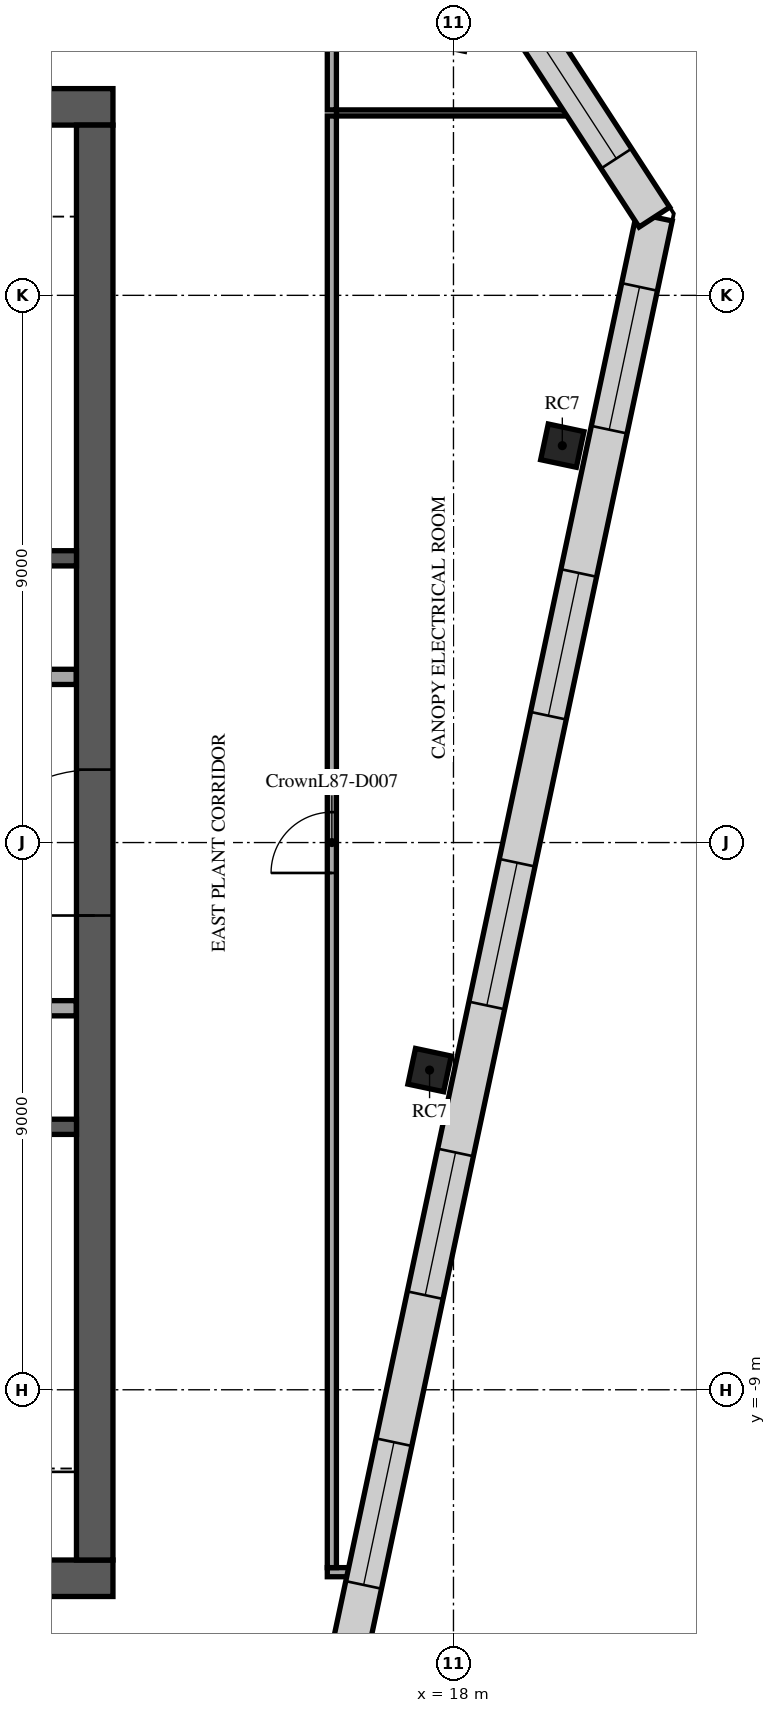
"""IFC4 building model, lengths in metres.
Left out: names, types, materials, properties, quantities, classifications, styles, units other than length and angle.
Written with IfcOpenShell. Run it as: python <this file> out.ifc"""

import sys

from ifc_helpers import new_model, si_unit, direction, frame, frame_2d, origin, origin_2d, place, context, subcontext, project, spatial, rectangle, extrude, element, fill, save


model = new_model("IFC4")
c1 = context("Model", 3, precision=1e-05, world=origin(), true_north=direction((0.0, 1.0)))
c2 = subcontext(c1, "Body", "Model", "MODEL_VIEW")
j1 = project(units=[si_unit("LENGTHUNIT", "METRE"), si_unit("PLANEANGLEUNIT", "RADIAN")], contexts=[c1])
p1 = place(None, origin())
s1 = spatial("IfcSite", under=j1, at=p1, CompositionType="ELEMENT")
p2 = place(p1, origin())
s2 = spatial("IfcBuilding", under=s1, at=p2, CompositionType="ELEMENT")
p3 = place(p2, frame((0.0, 0.0, 373.1)))
s3 = spatial("IfcBuildingStorey", under=s2, at=p3, CompositionType="ELEMENT", Elevation=373.1)
for number, where, z_axis, x_axis in (
    (1, (17.607, -3.742, 0.0), (0.0, 0.0, 1.0), (0.208, 0.978, 0.0)),
    (2, (19.79, 6.528, 0.0), (0.0, 0.0, 1.0), (0.208, 0.978, 0.0)),
):
    element("IfcColumn", number, at=place(p3, frame(where, z_axis=z_axis, x_axis=x_axis)), inside=s3, PredefinedType="COLUMN", context=c2, shape_type="SweptSolid", body=[
        extrude(rectangle(XDim=0.6, YDim=0.6, at=origin_2d()), origin(), (0.0, 0.0, 1.0), 3.5),
    ])
p4 = place(p3, frame((-12.4, 12.1, 0.0), z_axis=(0.0, 0.0, 1.0), x_axis=(1.0, 0.0, 0.0)))
e3 = element("IfcWall", 3, at=p4, inside=s3, PredefinedType="SHEAR", context=c2, shape_type="SweptSolid", body=[
    extrude(rectangle(XDim=24.8, YDim=0.6, at=frame_2d((12.4, 0.0))), origin(), (0.0, 0.0, 1.0), 3.2),
])
p5 = place(p4, frame((11.2, 0.0, 0.0)))
e4 = element("IfcOpeningElement", 4, at=p5, cuts=e3, PredefinedType="OPENING", context=c2, shape_type="SweptSolid", body=[
    extrude(rectangle(XDim=2.4, YDim=2.4, at=frame_2d((1.2, 1.2))), frame((0.0, 0.31, 0.0), z_axis=(0.0, -1.0, 0.0), x_axis=(1.0, 0.0, 0.0)), (0.0, 0.0, 1.0), 0.62),
])
p6 = place(p4, frame((22.025, 0.0, 0.0)))
e5 = element("IfcOpeningElement", 5, at=p6, cuts=e3, PredefinedType="OPENING", context=c2, shape_type="SweptSolid", body=[
    extrude(rectangle(XDim=1.2, YDim=2.1, at=frame_2d((0.6, 1.05))), frame((0.0, 0.31, 0.0), z_axis=(0.0, -1.0, 0.0), x_axis=(1.0, 0.0, 0.0)), (0.0, 0.0, 1.0), 0.62),
])
p7 = place(p4, frame((1.0, 0.0, 0.0)))
e6 = element("IfcOpeningElement", 6, at=p7, cuts=e3, PredefinedType="OPENING", context=c2, shape_type="SweptSolid", body=[
    extrude(rectangle(XDim=1.0, YDim=2.1, at=frame_2d((0.5, 1.05))), frame((0.0, 0.31, 0.0), z_axis=(0.0, -1.0, 0.0), x_axis=(1.0, 0.0, 0.0)), (0.0, 0.0, 1.0), 0.62),
])
p8 = place(p3, frame((-12.4, -12.1, 0.0), z_axis=(0.0, 0.0, 1.0), x_axis=(1.0, 0.0, 0.0)))
e7 = element("IfcWall", 7, at=p8, inside=s3, PredefinedType="SHEAR", context=c2, shape_type="SweptSolid", body=[
    extrude(rectangle(XDim=24.8, YDim=0.6, at=frame_2d((12.4, 0.0))), origin(), (0.0, 0.0, 1.0), 3.2),
])
p9 = place(p8, frame((7.3, 0.0, 0.0)))
e8 = element("IfcOpeningElement", 8, at=p9, cuts=e7, PredefinedType="OPENING", context=c2, shape_type="SweptSolid", body=[
    extrude(rectangle(XDim=2.0, YDim=2.1, at=frame_2d((1.0, 1.05))), frame((0.0, 0.31, 0.0), z_axis=(0.0, -1.0, 0.0), x_axis=(1.0, 0.0, 0.0)), (0.0, 0.0, 1.0), 0.62),
])
p10 = place(p8, frame((17.425, 0.0, 0.0)))
e9 = element("IfcOpeningElement", 9, at=p10, cuts=e7, PredefinedType="OPENING", context=c2, shape_type="SweptSolid", body=[
    extrude(rectangle(XDim=1.2, YDim=2.1, at=frame_2d((0.6, 1.05))), frame((0.0, 0.31, 0.0), z_axis=(0.0, -1.0, 0.0), x_axis=(1.0, 0.0, 0.0)), (0.0, 0.0, 1.0), 0.62),
])
p11 = place(p8, frame((1.575, 0.0, 0.0)))
e10 = element("IfcOpeningElement", 10, at=p11, cuts=e7, PredefinedType="OPENING", context=c2, shape_type="SweptSolid", body=[
    extrude(rectangle(XDim=1.2, YDim=2.1, at=frame_2d((0.6, 1.05))), frame((0.0, 0.31, 0.0), z_axis=(0.0, -1.0, 0.0), x_axis=(1.0, 0.0, 0.0)), (0.0, 0.0, 1.0), 0.62),
])
p12 = place(p8, frame((22.025, 0.0, 0.0)))
e11 = element("IfcOpeningElement", 11, at=p12, cuts=e7, PredefinedType="OPENING", context=c2, shape_type="SweptSolid", body=[
    extrude(rectangle(XDim=1.2, YDim=2.1, at=frame_2d((0.6, 1.05))), frame((0.0, 0.31, 0.0), z_axis=(0.0, -1.0, 0.0), x_axis=(1.0, 0.0, 0.0)), (0.0, 0.0, 1.0), 0.62),
])
p13 = place(p3, frame((12.1, -11.8, 0.0), z_axis=(0.0, 0.0, 1.0), x_axis=(0.0, 1.0, 0.0)))
e12 = element("IfcWall", 12, at=p13, inside=s3, PredefinedType="SHEAR", context=c2, shape_type="SweptSolid", body=[
    extrude(rectangle(XDim=23.6, YDim=0.6, at=frame_2d((11.8, 0.0))), origin(), (0.0, 0.0, 1.0), 3.2),
])
p14 = place(p13, frame((10.6, 0.0, 0.0)))
e13 = element("IfcOpeningElement", 13, at=p14, cuts=e12, PredefinedType="OPENING", context=c2, shape_type="SweptSolid", body=[
    extrude(rectangle(XDim=2.4, YDim=2.4, at=frame_2d((1.2, 1.2))), frame((0.0, 0.31, 0.0), z_axis=(0.0, -1.0, 0.0), x_axis=(1.0, 0.0, 0.0)), (0.0, 0.0, 1.0), 0.62),
])
for number, where, z_axis, x_axis in (
    (14, (8.65, 4.675, 0.0), (0.0, 0.0, 1.0), (1.0, 0.0, 0.0)),
    (15, (8.65, -4.675, 0.0), (0.0, 0.0, 1.0), (1.0, 0.0, 0.0)),
):
    element("IfcWall", number, at=place(p3, frame(where, z_axis=z_axis, x_axis=x_axis)), inside=s3, PredefinedType="SOLIDWALL", context=c2, shape_type="SweptSolid", body=[
        extrude(rectangle(XDim=3.15, YDim=0.25, at=frame_2d((1.575, 0.0))), origin(), (0.0, 0.0, 1.0), 3.2),
    ])
p15 = place(p3, frame((5.63, -2.725, 0.0), z_axis=(0.0, 0.0, 1.0), x_axis=(1.0, 0.0, 0.0)))
e16 = element("IfcWall", 16, at=p15, inside=s3, PredefinedType="PARTITIONING", context=c2, shape_type="SweptSolid", body=[
    extrude(rectangle(XDim=6.165, YDim=0.25, at=frame_2d((3.083, 0.0))), origin(), (0.0, 0.0, 1.0), 3.2),
])
p16 = place(p15, frame((0.745, 0.0, 0.0)))
e17 = element("IfcOpeningElement", 17, at=p16, cuts=e16, PredefinedType="OPENING", context=c2, shape_type="SweptSolid", body=[
    extrude(rectangle(XDim=1.0, YDim=2.1, at=frame_2d((0.5, 1.05))), frame((0.0, 0.135, 0.0), z_axis=(0.0, -1.0, 0.0), x_axis=(1.0, 0.0, 0.0)), (0.0, 0.0, 1.0), 0.27),
])
p17 = place(p15, frame((3.92, 0.0, 0.0)))
e18 = element("IfcOpeningElement", 18, at=p17, cuts=e16, PredefinedType="OPENING", context=c2, shape_type="SweptSolid", body=[
    extrude(rectangle(XDim=0.9, YDim=2.1, at=frame_2d((0.45, 1.05))), frame((0.0, 0.135, 0.0), z_axis=(0.0, -1.0, 0.0), x_axis=(1.0, 0.0, 0.0)), (0.0, 0.0, 1.0), 0.27),
])
p18 = place(p3, frame((-11.795, 2.725, 0.0), z_axis=(0.0, 0.0, 1.0), x_axis=(1.0, 0.0, 0.0)))
e19 = element("IfcWall", 19, at=p18, inside=s3, PredefinedType="PARTITIONING", context=c2, shape_type="SweptSolid", body=[
    extrude(rectangle(XDim=23.59, YDim=0.25, at=frame_2d((11.795, 0.0))), origin(), (0.0, 0.0, 1.0), 3.2),
])
p19 = place(p18, frame((21.345, 0.0, 0.0)))
e20 = element("IfcOpeningElement", 20, at=p19, cuts=e19, PredefinedType="OPENING", context=c2, shape_type="SweptSolid", body=[
    extrude(rectangle(XDim=0.9, YDim=2.1, at=frame_2d((0.45, 1.05))), frame((0.0, 0.135, 0.0), z_axis=(0.0, -1.0, 0.0), x_axis=(1.0, 0.0, 0.0)), (0.0, 0.0, 1.0), 0.27),
])
p20 = place(p18, frame((1.345, 0.0, 0.0)))
e21 = element("IfcOpeningElement", 21, at=p20, cuts=e19, PredefinedType="OPENING", context=c2, shape_type="SweptSolid", body=[
    extrude(rectangle(XDim=0.9, YDim=2.1, at=frame_2d((0.45, 1.05))), frame((0.0, 0.135, 0.0), z_axis=(0.0, -1.0, 0.0), x_axis=(1.0, 0.0, 0.0)), (0.0, 0.0, 1.0), 0.27),
])
p21 = place(p18, frame((4.42, 0.0, 0.0)))
e22 = element("IfcOpeningElement", 22, at=p21, cuts=e19, PredefinedType="OPENING", context=c2, shape_type="SweptSolid", body=[
    extrude(rectangle(XDim=1.0, YDim=2.1, at=frame_2d((0.5, 1.05))), frame((0.0, 0.135, 0.0), z_axis=(0.0, -1.0, 0.0), x_axis=(1.0, 0.0, 0.0)), (0.0, 0.0, 1.0), 0.27),
])
p22 = place(p18, frame((7.17, 0.0, 0.0)))
e23 = element("IfcOpeningElement", 23, at=p22, cuts=e19, PredefinedType="OPENING", context=c2, shape_type="SweptSolid", body=[
    extrude(rectangle(XDim=1.0, YDim=2.1, at=frame_2d((0.5, 1.05))), frame((0.0, 0.135, 0.0), z_axis=(0.0, -1.0, 0.0), x_axis=(1.0, 0.0, 0.0)), (0.0, 0.0, 1.0), 0.27),
])
p23 = place(p18, frame((12.57, 0.0, 0.0)))
e24 = element("IfcOpeningElement", 24, at=p23, cuts=e19, PredefinedType="OPENING", context=c2, shape_type="SweptSolid", body=[
    extrude(rectangle(XDim=1.2, YDim=2.1, at=frame_2d((0.6, 1.05))), frame((0.0, 0.135, 0.0), z_axis=(0.0, -1.0, 0.0), x_axis=(1.0, 0.0, 0.0)), (0.0, 0.0, 1.0), 0.27),
])
p24 = place(p3, frame((15.925, -12.0, 0.0), z_axis=(0.0, 0.0, 1.0), x_axis=(1.0, 0.0, 0.0)))
e25 = element("IfcWall", 25, at=p24, inside=s3, PredefinedType="PARTITIONING", context=c2, shape_type="SweptSolid", body=[
    extrude(rectangle(XDim=0.54, YDim=0.15, at=frame_2d((0.27, 0.0))), origin(), (0.0, 0.0, 1.0), 3.2),
])
p25 = place(p3, frame((16.075, 12.0, 0.0), z_axis=(0.0, 0.0, 1.0), x_axis=(1.0, 0.0, 0.0)))
e26 = element("IfcWall", 26, at=p25, inside=s3, PredefinedType="PARTITIONING", context=c2, shape_type="SweptSolid", body=[
    extrude(rectangle(XDim=3.997, YDim=0.1, at=frame_2d((1.999, 0.0))), origin(), (0.0, 0.0, 1.0), 3.2),
])
p26 = place(p3, frame((16.0, -11.925, 0.0), z_axis=(0.0, 0.0, 1.0), x_axis=(0.0, 1.0, 0.0)))
e27 = element("IfcWall", 27, at=p26, inside=s3, PredefinedType="PARTITIONING", context=c2, shape_type="SweptSolid", body=[
    extrude(rectangle(XDim=23.875, YDim=0.15, at=frame_2d((11.938, 0.0))), origin(), (0.0, 0.0, 1.0), 2.63),
])
p27 = place(p26, frame((11.425, 0.0, 0.0)))
e28 = element("IfcOpeningElement", 28, at=p27, cuts=e27, PredefinedType="OPENING", context=c2, shape_type="SweptSolid", body=[
    extrude(rectangle(XDim=1.0, YDim=2.1, at=frame_2d((0.5, 1.05))), frame((0.0, 0.085, 0.0), z_axis=(0.0, -1.0, 0.0), x_axis=(1.0, 0.0, 0.0)), (0.0, 0.0, 1.0), 0.17),
])
p28 = place(p3, frame((16.0, 12.05, 0.0), z_axis=(0.0, 0.0, 1.0), x_axis=(0.0, 1.0, 0.0)))
e29 = element("IfcWall", 29, at=p28, inside=s3, PredefinedType="PARTITIONING", context=c2, shape_type="SweptSolid", body=[
    extrude(rectangle(XDim=3.875, YDim=0.15, at=frame_2d((1.938, 0.0))), origin(), (0.0, 0.0, 1.0), 2.63),
])
p29 = place(p3, frame((15.279, -18.062, 0.0), z_axis=(0.0, 0.0, 1.0), x_axis=(0.207909936091, 0.978147973711, 0.0)))
e30 = element("IfcWall", 30, at=p29, inside=s3, PredefinedType="STANDARD", context=c2, shape_type="SweptSolid", body=[
    extrude(rectangle(XDim=28.982, YDim=0.6, at=frame_2d((14.491, 0.0))), origin(), (0.0, 0.0, 1.0), 3.2),
])
p30 = place(p29, frame((1.174, 0.0, 0.6)))
e31 = element("IfcOpeningElement", 31, at=p30, cuts=e30, PredefinedType="OPENING", context=c2, shape_type="SweptSolid", body=[
    extrude(rectangle(XDim=2.4, YDim=1.85, at=frame_2d((1.2, 0.925))), frame((0.0, 0.31, 0.0), z_axis=(0.0, -1.0, 0.0), x_axis=(1.0, 0.0, 0.0)), (0.0, 0.0, 1.0), 0.62),
])
p31 = place(p29, frame((5.983, 0.0, 0.6)))
e32 = element("IfcOpeningElement", 32, at=p31, cuts=e30, PredefinedType="OPENING", context=c2, shape_type="SweptSolid", body=[
    extrude(rectangle(XDim=2.4, YDim=1.85, at=frame_2d((1.2, 0.925))), frame((0.0, 0.31, 0.0), z_axis=(0.0, -1.0, 0.0), x_axis=(1.0, 0.0, 0.0)), (0.0, 0.0, 1.0), 0.62),
])
p32 = place(p29, frame((10.855, 0.0, 0.6)))
e33 = element("IfcOpeningElement", 33, at=p32, cuts=e30, PredefinedType="OPENING", context=c2, shape_type="SweptSolid", body=[
    extrude(rectangle(XDim=2.4, YDim=1.85, at=frame_2d((1.2, 0.925))), frame((0.0, 0.31, 0.0), z_axis=(0.0, -1.0, 0.0), x_axis=(1.0, 0.0, 0.0)), (0.0, 0.0, 1.0), 0.62),
])
p33 = place(p29, frame((15.727, 0.0, 0.6)))
e34 = element("IfcOpeningElement", 34, at=p33, cuts=e30, PredefinedType="OPENING", context=c2, shape_type="SweptSolid", body=[
    extrude(rectangle(XDim=2.4, YDim=1.85, at=frame_2d((1.2, 0.925))), frame((0.0, 0.31, 0.0), z_axis=(0.0, -1.0, 0.0), x_axis=(1.0, 0.0, 0.0)), (0.0, 0.0, 1.0), 0.62),
])
p34 = place(p29, frame((20.599, 0.0, 0.6)))
e35 = element("IfcOpeningElement", 35, at=p34, cuts=e30, PredefinedType="OPENING", context=c2, shape_type="SweptSolid", body=[
    extrude(rectangle(XDim=2.4, YDim=1.85, at=frame_2d((1.2, 0.925))), frame((0.0, 0.31, 0.0), z_axis=(0.0, -1.0, 0.0), x_axis=(1.0, 0.0, 0.0)), (0.0, 0.0, 1.0), 0.62),
])
p35 = place(p29, frame((25.408, 0.0, 0.6)))
e36 = element("IfcOpeningElement", 36, at=p35, cuts=e30, PredefinedType="OPENING", context=c2, shape_type="SweptSolid", body=[
    extrude(rectangle(XDim=2.4, YDim=1.85, at=frame_2d((1.2, 0.925))), frame((0.0, 0.31, 0.0), z_axis=(0.0, -1.0, 0.0), x_axis=(1.0, 0.0, 0.0)), (0.0, 0.0, 1.0), 0.62),
])
p36 = place(p3, frame((21.304, 10.286, 0.0), z_axis=(0.0, 0.0, 1.0), x_axis=(-0.544646568575, 0.838665675546, 0.0)))
e37 = element("IfcWall", 37, at=p36, inside=s3, PredefinedType="STANDARD", context=c2, shape_type="SweptSolid", body=[
    extrude(rectangle(XDim=10.195, YDim=0.6, at=frame_2d((5.098, 0.0))), origin(), (0.0, 0.0, 1.0), 3.2),
])
p37 = place(p36, frame((1.149, 0.0, 0.6)))
e38 = element("IfcOpeningElement", 38, at=p37, cuts=e37, PredefinedType="OPENING", context=c2, shape_type="SweptSolid", body=[
    extrude(rectangle(XDim=2.8, YDim=1.85, at=frame_2d((1.4, 0.925))), frame((0.0, 0.31, 0.0), z_axis=(0.0, -1.0, 0.0), x_axis=(1.0, 0.0, 0.0)), (0.0, 0.0, 1.0), 0.62),
])
p38 = place(p36, frame((6.246, 0.0, 0.6)))
e39 = element("IfcOpeningElement", 39, at=p38, cuts=e37, PredefinedType="OPENING", context=c2, shape_type="SweptSolid", body=[
    extrude(rectangle(XDim=2.8, YDim=1.85, at=frame_2d((1.4, 0.925))), frame((0.0, 0.31, 0.0), z_axis=(0.0, -1.0, 0.0), x_axis=(1.0, 0.0, 0.0)), (0.0, 0.0, 1.0), 0.62),
])
p39 = place(p14, origin())
e40 = element("IfcDoor", 40, at=p39, inside=s3, OperationType="SINGLE_SWING_LEFT", PredefinedType="DOOR", context=c2, shape_type="SweptSolid", body=[
    extrude(rectangle(XDim=2.4, YDim=2.4, at=frame_2d((1.2, 1.2))), frame((0.0, 0.025, 0.0), z_axis=(0.0, -1.0, 0.0), x_axis=(1.0, 0.0, 0.0)), (0.0, 0.0, 1.0), 0.05),
])
fill(e13, e40)
p40 = place(p27, origin())
e41 = element("IfcDoor", 41, at=p40, inside=s3, OperationType="SINGLE_SWING_LEFT", PredefinedType="DOOR", context=c2, shape_type="SweptSolid", body=[
    extrude(rectangle(XDim=1.0, YDim=2.1, at=frame_2d((0.5, 1.05))), frame((0.0, 0.025, 0.0), z_axis=(0.0, -1.0, 0.0), x_axis=(1.0, 0.0, 0.0)), (0.0, 0.0, 1.0), 0.05),
])
fill(e28, e41)
p41 = place(p31, origin())
e42 = element("IfcWindow", 42, at=p41, inside=s3, PartitioningType="SINGLE_PANEL", PredefinedType="USERDEFINED", context=c2, shape_type="SweptSolid", body=[
    extrude(rectangle(XDim=2.4, YDim=1.85, at=frame_2d((1.2, 0.925))), frame((0.0, 0.03, 0.0), z_axis=(0.0, -1.0, 0.0), x_axis=(1.0, 0.0, 0.0)), (0.0, 0.0, 1.0), 0.06),
])
fill(e32, e42)
p42 = place(p32, origin())
e43 = element("IfcWindow", 43, at=p42, inside=s3, PartitioningType="SINGLE_PANEL", PredefinedType="USERDEFINED", context=c2, shape_type="SweptSolid", body=[
    extrude(rectangle(XDim=2.4, YDim=1.85, at=frame_2d((1.2, 0.925))), frame((0.0, 0.03, 0.0), z_axis=(0.0, -1.0, 0.0), x_axis=(1.0, 0.0, 0.0)), (0.0, 0.0, 1.0), 0.06),
])
fill(e33, e43)
p43 = place(p33, origin())
e44 = element("IfcWindow", 44, at=p43, inside=s3, PartitioningType="SINGLE_PANEL", PredefinedType="USERDEFINED", context=c2, shape_type="SweptSolid", body=[
    extrude(rectangle(XDim=2.4, YDim=1.85, at=frame_2d((1.2, 0.925))), frame((0.0, 0.03, 0.0), z_axis=(0.0, -1.0, 0.0), x_axis=(1.0, 0.0, 0.0)), (0.0, 0.0, 1.0), 0.06),
])
fill(e34, e44)
p44 = place(p34, origin())
e45 = element("IfcWindow", 45, at=p44, inside=s3, PartitioningType="SINGLE_PANEL", PredefinedType="USERDEFINED", context=c2, shape_type="SweptSolid", body=[
    extrude(rectangle(XDim=2.4, YDim=1.85, at=frame_2d((1.2, 0.925))), frame((0.0, 0.03, 0.0), z_axis=(0.0, -1.0, 0.0), x_axis=(1.0, 0.0, 0.0)), (0.0, 0.0, 1.0), 0.06),
])
fill(e35, e45)
p45 = place(p35, origin())
e46 = element("IfcWindow", 46, at=p45, inside=s3, PartitioningType="SINGLE_PANEL", PredefinedType="USERDEFINED", context=c2, shape_type="SweptSolid", body=[
    extrude(rectangle(XDim=2.4, YDim=1.85, at=frame_2d((1.2, 0.925))), frame((0.0, 0.03, 0.0), z_axis=(0.0, -1.0, 0.0), x_axis=(1.0, 0.0, 0.0)), (0.0, 0.0, 1.0), 0.06),
])
fill(e36, e46)
p46 = place(p37, origin())
e47 = element("IfcWindow", 47, at=p46, inside=s3, PartitioningType="SINGLE_PANEL", PredefinedType="USERDEFINED", context=c2, shape_type="SweptSolid", body=[
    extrude(rectangle(XDim=2.8, YDim=1.85, at=frame_2d((1.4, 0.925))), frame((0.0, 0.03, 0.0), z_axis=(0.0, -1.0, 0.0), x_axis=(1.0, 0.0, 0.0)), (0.0, 0.0, 1.0), 0.06),
])
fill(e38, e47)
save(model, sys.argv[1])
